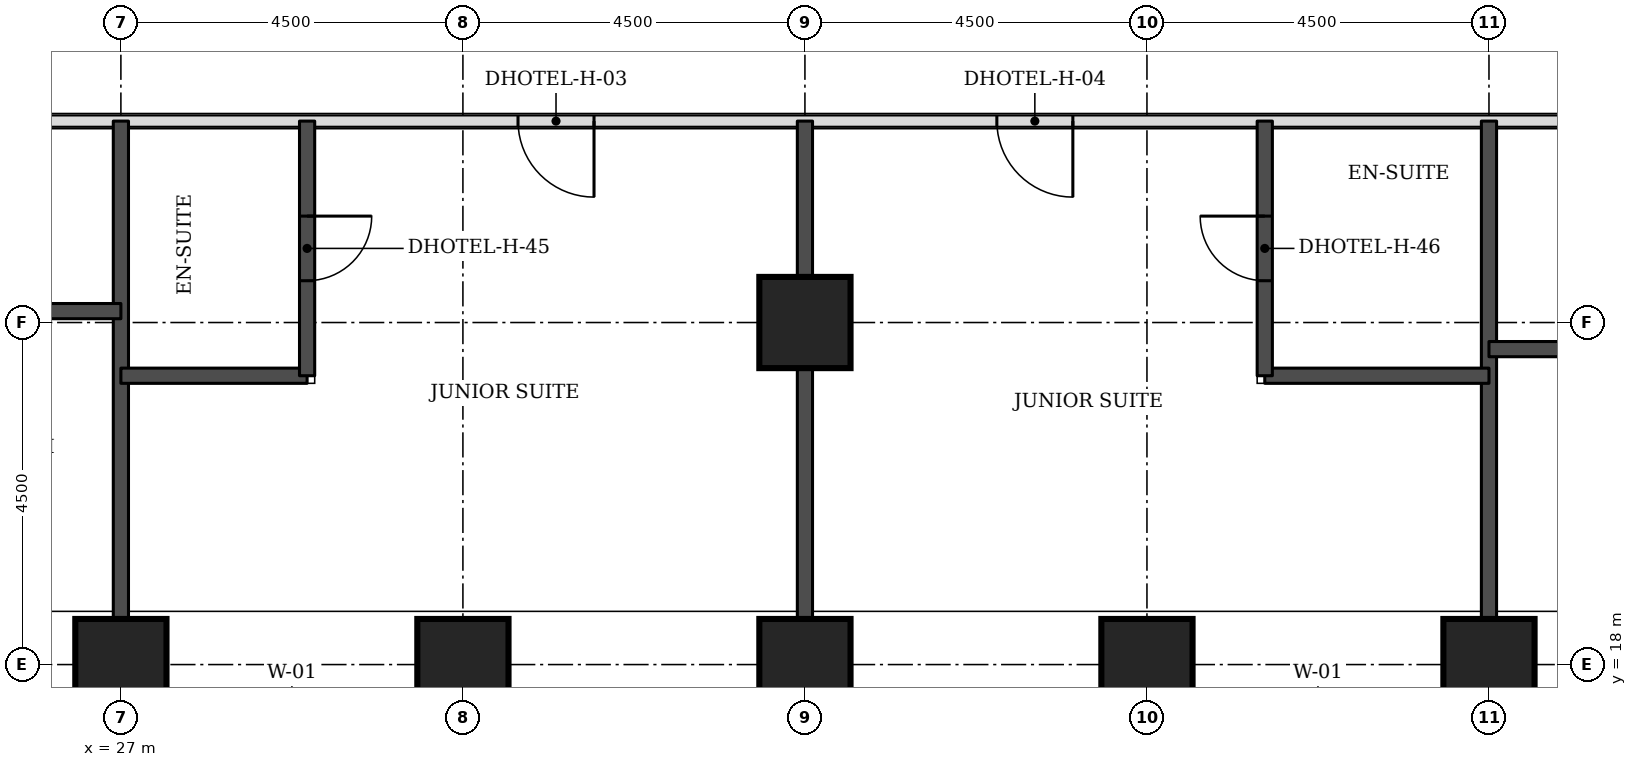
"""IFC4 building model, lengths in metres.
Left out: names, types, materials, properties, quantities, classifications, styles, units other than length and angle.
Written with IfcOpenShell. Run it as: python <this file> out.ifc"""

import sys

from ifc_helpers import new_model, si_unit, direction, frame, frame_2d, origin, origin_2d, place, context, subcontext, project, spatial, rectangle, extrude, element, fill, save


model = new_model("IFC4")
c1 = context("Model", 3, precision=1e-05, world=origin(), true_north=direction((0.0, 1.0)))
c2 = subcontext(c1, "Body", "Model", "MODEL_VIEW")
j1 = project(units=[si_unit("LENGTHUNIT", "METRE"), si_unit("PLANEANGLEUNIT", "RADIAN")], contexts=[c1])
p1 = place(None, origin())
s1 = spatial("IfcSite", under=j1, at=p1, CompositionType="ELEMENT")
p2 = place(p1, origin())
s2 = spatial("IfcBuilding", under=s1, at=p2, CompositionType="ELEMENT")
p3 = place(p2, frame((0.0, 0.0, 46.2)))
s3 = spatial("IfcBuildingStorey", under=s2, at=p3, CompositionType="ELEMENT", Elevation=46.2)
for number, where, z_axis, x_axis in (
    (1, (27.0, 18.0, 0.0), (0.0, 0.0, 1.0), (1.0, 0.0, 0.0)),
    (2, (31.5, 18.0, 0.0), (0.0, 0.0, 1.0), (1.0, 0.0, 0.0)),
    (3, (36.0, 18.0, 0.0), (0.0, 0.0, 1.0), (1.0, 0.0, 0.0)),
    (4, (40.5, 18.0, 0.0), (0.0, 0.0, 1.0), (1.0, 0.0, 0.0)),
    (5, (45.0, 18.0, 0.0), (0.0, 0.0, 1.0), (1.0, 0.0, 0.0)),
    (6, (36.0, 22.5, 0.0), (0.0, 0.0, 1.0), (1.0, 0.0, 0.0)),
):
    element("IfcColumn", number, at=place(p3, frame(where, z_axis=z_axis, x_axis=x_axis)), inside=s3, PredefinedType="COLUMN", context=c2, shape_type="SweptSolid", body=[
        extrude(rectangle(XDim=1.2, YDim=1.2, at=origin_2d()), origin(), (0.0, 0.0, 1.0), 3.3),
    ])
p4 = place(p3, frame((20.65, 25.15, 0.0), z_axis=(0.0, 0.0, 1.0), x_axis=(1.0, 0.0, 0.0)))
e7 = element("IfcWall", 7, at=p4, inside=s3, PredefinedType="PARTITIONING", context=c2, shape_type="SweptSolid", body=[
    extrude(rectangle(XDim=30.85, YDim=0.15, at=frame_2d((15.425, 0.0))), origin(), (0.0, 0.0, 1.0), 3.08),
])
p5 = place(p4, frame((2.425, 0.0, 0.0)))
e8 = element("IfcOpeningElement", 8, at=p5, cuts=e7, PredefinedType="OPENING", context=c2, shape_type="SweptSolid", body=[
    extrude(rectangle(XDim=1.0, YDim=2.1, at=frame_2d((0.5, 1.05))), frame((0.0, 0.085, 0.0), z_axis=(0.0, -1.0, 0.0), x_axis=(1.0, 0.0, 0.0)), (0.0, 0.0, 1.0), 0.17),
])
p6 = place(p4, frame((11.575, 0.0, 0.0)))
e9 = element("IfcOpeningElement", 9, at=p6, cuts=e7, PredefinedType="OPENING", context=c2, shape_type="SweptSolid", body=[
    extrude(rectangle(XDim=1.0, YDim=2.1, at=frame_2d((0.5, 1.05))), frame((0.0, 0.085, 0.0), z_axis=(0.0, -1.0, 0.0), x_axis=(1.0, 0.0, 0.0)), (0.0, 0.0, 1.0), 0.17),
])
p7 = place(p4, frame((17.875, 0.0, 0.0)))
e10 = element("IfcOpeningElement", 10, at=p7, cuts=e7, PredefinedType="OPENING", context=c2, shape_type="SweptSolid", body=[
    extrude(rectangle(XDim=1.0, YDim=2.1, at=frame_2d((0.5, 1.05))), frame((0.0, 0.085, 0.0), z_axis=(0.0, -1.0, 0.0), x_axis=(1.0, 0.0, 0.0)), (0.0, 0.0, 1.0), 0.17),
])
p8 = place(p4, frame((27.025, 0.0, 0.0)))
e11 = element("IfcOpeningElement", 11, at=p8, cuts=e7, PredefinedType="OPENING", context=c2, shape_type="SweptSolid", body=[
    extrude(rectangle(XDim=1.0, YDim=2.1, at=frame_2d((0.5, 1.05))), frame((0.0, 0.085, 0.0), z_axis=(0.0, -1.0, 0.0), x_axis=(1.0, 0.0, 0.0)), (0.0, 0.0, 1.0), 0.17),
])
p9 = place(p4, frame((0.425, 0.0, 0.0)))
e12 = element("IfcOpeningElement", 12, at=p9, cuts=e7, PredefinedType="OPENING", context=c2, shape_type="SweptSolid", body=[
    extrude(rectangle(XDim=1.0, YDim=2.1, at=frame_2d((0.5, 1.05))), frame((0.0, 0.085, 0.0), z_axis=(0.0, -1.0, 0.0), x_axis=(1.0, 0.0, 0.0)), (0.0, 0.0, 1.0), 0.17),
])
p10 = place(p4, frame((29.35, 0.0, 0.0)))
e13 = element("IfcOpeningElement", 13, at=p10, cuts=e7, PredefinedType="OPENING", context=c2, shape_type="SweptSolid", body=[
    extrude(rectangle(XDim=1.0, YDim=2.1, at=frame_2d((0.5, 1.05))), frame((0.0, 0.085, 0.0), z_axis=(0.0, -1.0, 0.0), x_axis=(1.0, 0.0, 0.0)), (0.0, 0.0, 1.0), 0.17),
])
for number, where, z_axis, x_axis in (
    (14, (27.0, 18.6, 0.0), (0.0, 0.0, 1.0), (0.0, 1.0, 0.0)),
    (15, (36.0, 18.6, 0.0), (0.0, 0.0, 1.0), (0.0, 1.0, 0.0)),
    (16, (45.0, 18.6, 0.0), (0.0, 0.0, 1.0), (0.0, 1.0, 0.0)),
):
    element("IfcWall", number, at=place(p3, frame(where, z_axis=z_axis, x_axis=x_axis)), inside=s3, PredefinedType="SOLIDWALL", context=c2, shape_type="SweptSolid", body=[
        extrude(rectangle(XDim=6.55, YDim=0.2, at=frame_2d((3.275, 0.0))), origin(), (0.0, 0.0, 1.0), 3.08),
    ])
p11 = place(p3, frame((27.0, 21.8, 0.0), z_axis=(0.0, 0.0, 1.0), x_axis=(1.0, 0.0, 0.0)))
e17 = element("IfcWall", 17, at=p11, inside=s3, PredefinedType="SOLIDWALL", context=c2, shape_type="SweptSolid", body=[
    extrude(rectangle(XDim=2.45, YDim=0.2, at=frame_2d((1.225, 0.0))), origin(), (0.0, 0.0, 1.0), 3.08),
])
p12 = place(p3, frame((29.45, 21.8, 0.0), z_axis=(0.0, 0.0, 1.0), x_axis=(0.0, 1.0, 0.0)))
e18 = element("IfcWall", 18, at=p12, inside=s3, PredefinedType="SOLIDWALL", context=c2, shape_type="SweptSolid", body=[
    extrude(rectangle(XDim=3.35, YDim=0.2, at=frame_2d((1.675, 0.0))), origin(), (0.0, 0.0, 1.0), 3.08),
])
p13 = place(p12, frame((1.25, 0.0, 0.0)))
e19 = element("IfcOpeningElement", 19, at=p13, cuts=e18, PredefinedType="OPENING", context=c2, shape_type="SweptSolid", body=[
    extrude(rectangle(XDim=0.85, YDim=2.1, at=frame_2d((0.425, 1.05))), frame((0.0, 0.11, 0.0), z_axis=(0.0, -1.0, 0.0), x_axis=(1.0, 0.0, 0.0)), (0.0, 0.0, 1.0), 0.22),
])
p14 = place(p3, frame((42.05, 21.8, 0.0), z_axis=(0.0, 0.0, 1.0), x_axis=(1.0, 0.0, 0.0)))
e20 = element("IfcWall", 20, at=p14, inside=s3, PredefinedType="SOLIDWALL", context=c2, shape_type="SweptSolid", body=[
    extrude(rectangle(XDim=2.95, YDim=0.2, at=frame_2d((1.475, 0.0))), origin(), (0.0, 0.0, 1.0), 3.08),
])
p15 = place(p3, frame((42.05, 21.8, 0.0), z_axis=(0.0, 0.0, 1.0), x_axis=(0.0, 1.0, 0.0)))
e21 = element("IfcWall", 21, at=p15, inside=s3, PredefinedType="SOLIDWALL", context=c2, shape_type="SweptSolid", body=[
    extrude(rectangle(XDim=3.35, YDim=0.2, at=frame_2d((1.675, 0.0))), origin(), (0.0, 0.0, 1.0), 3.08),
])
p16 = place(p15, frame((1.25, 0.0, 0.0)))
e22 = element("IfcOpeningElement", 22, at=p16, cuts=e21, PredefinedType="OPENING", context=c2, shape_type="SweptSolid", body=[
    extrude(rectangle(XDim=0.85, YDim=2.1, at=frame_2d((0.425, 1.05))), frame((0.0, 0.11, 0.0), z_axis=(0.0, -1.0, 0.0), x_axis=(1.0, 0.0, 0.0)), (0.0, 0.0, 1.0), 0.22),
])
p17 = place(p3, frame((45.0, 22.15, 0.0), z_axis=(0.0, 0.0, 1.0), x_axis=(1.0, 0.0, 0.0)))
e23 = element("IfcWall", 23, at=p17, inside=s3, PredefinedType="SOLIDWALL", context=c2, shape_type="SweptSolid", body=[
    extrude(rectangle(XDim=1.85, YDim=0.2, at=frame_2d((0.925, 0.0))), origin(), (0.0, 0.0, 1.0), 3.08),
])
p18 = place(p3, frame((24.65, 22.65, 0.0), z_axis=(0.0, 0.0, 1.0), x_axis=(1.0, 0.0, 0.0)))
e24 = element("IfcWall", 24, at=p18, inside=s3, PredefinedType="SOLIDWALL", context=c2, shape_type="SweptSolid", body=[
    extrude(rectangle(XDim=2.35, YDim=0.2, at=frame_2d((1.175, 0.0))), origin(), (0.0, 0.0, 1.0), 3.08),
])
p19 = place(p6, frame((1.0, 0.0, 0.0), z_axis=(0.0, 0.0, 1.0), x_axis=(-1.0, 0.0, 0.0)))
e25 = element("IfcDoor", 25, at=p19, inside=s3, OperationType="SINGLE_SWING_LEFT", PredefinedType="DOOR", context=c2, shape_type="SweptSolid", body=[
    extrude(rectangle(XDim=1.0, YDim=2.1, at=frame_2d((0.5, 1.05))), frame((0.0, 0.025, 0.0), z_axis=(0.0, -1.0, 0.0), x_axis=(1.0, 0.0, 0.0)), (0.0, 0.0, 1.0), 0.05),
])
fill(e9, e25)
p20 = place(p13, frame((0.85, 0.0, 0.0), z_axis=(0.0, 0.0, 1.0), x_axis=(-1.0, 0.0, 0.0)))
e26 = element("IfcDoor", 26, at=p20, inside=s3, OperationType="SINGLE_SWING_LEFT", PredefinedType="DOOR", context=c2, shape_type="SweptSolid", body=[
    extrude(rectangle(XDim=0.85, YDim=2.1, at=frame_2d((0.425, 1.05))), frame((0.0, 0.025, 0.0), z_axis=(0.0, -1.0, 0.0), x_axis=(1.0, 0.0, 0.0)), (0.0, 0.0, 1.0), 0.05),
])
fill(e19, e26)
p21 = place(p7, frame((1.0, 0.0, 0.0), z_axis=(0.0, 0.0, 1.0), x_axis=(-1.0, 0.0, 0.0)))
e27 = element("IfcDoor", 27, at=p21, inside=s3, OperationType="SINGLE_SWING_LEFT", PredefinedType="DOOR", context=c2, shape_type="SweptSolid", body=[
    extrude(rectangle(XDim=1.0, YDim=2.1, at=frame_2d((0.5, 1.05))), frame((0.0, 0.025, 0.0), z_axis=(0.0, -1.0, 0.0), x_axis=(1.0, 0.0, 0.0)), (0.0, 0.0, 1.0), 0.05),
])
fill(e10, e27)
p22 = place(p16, origin())
e28 = element("IfcDoor", 28, at=p22, inside=s3, OperationType="SINGLE_SWING_RIGHT", PredefinedType="DOOR", context=c2, shape_type="SweptSolid", body=[
    extrude(rectangle(XDim=0.85, YDim=2.1, at=frame_2d((0.425, 1.05))), frame((0.0, 0.025, 0.0), z_axis=(0.0, -1.0, 0.0), x_axis=(1.0, 0.0, 0.0)), (0.0, 0.0, 1.0), 0.05),
])
fill(e22, e28)
save(model, sys.argv[1])
